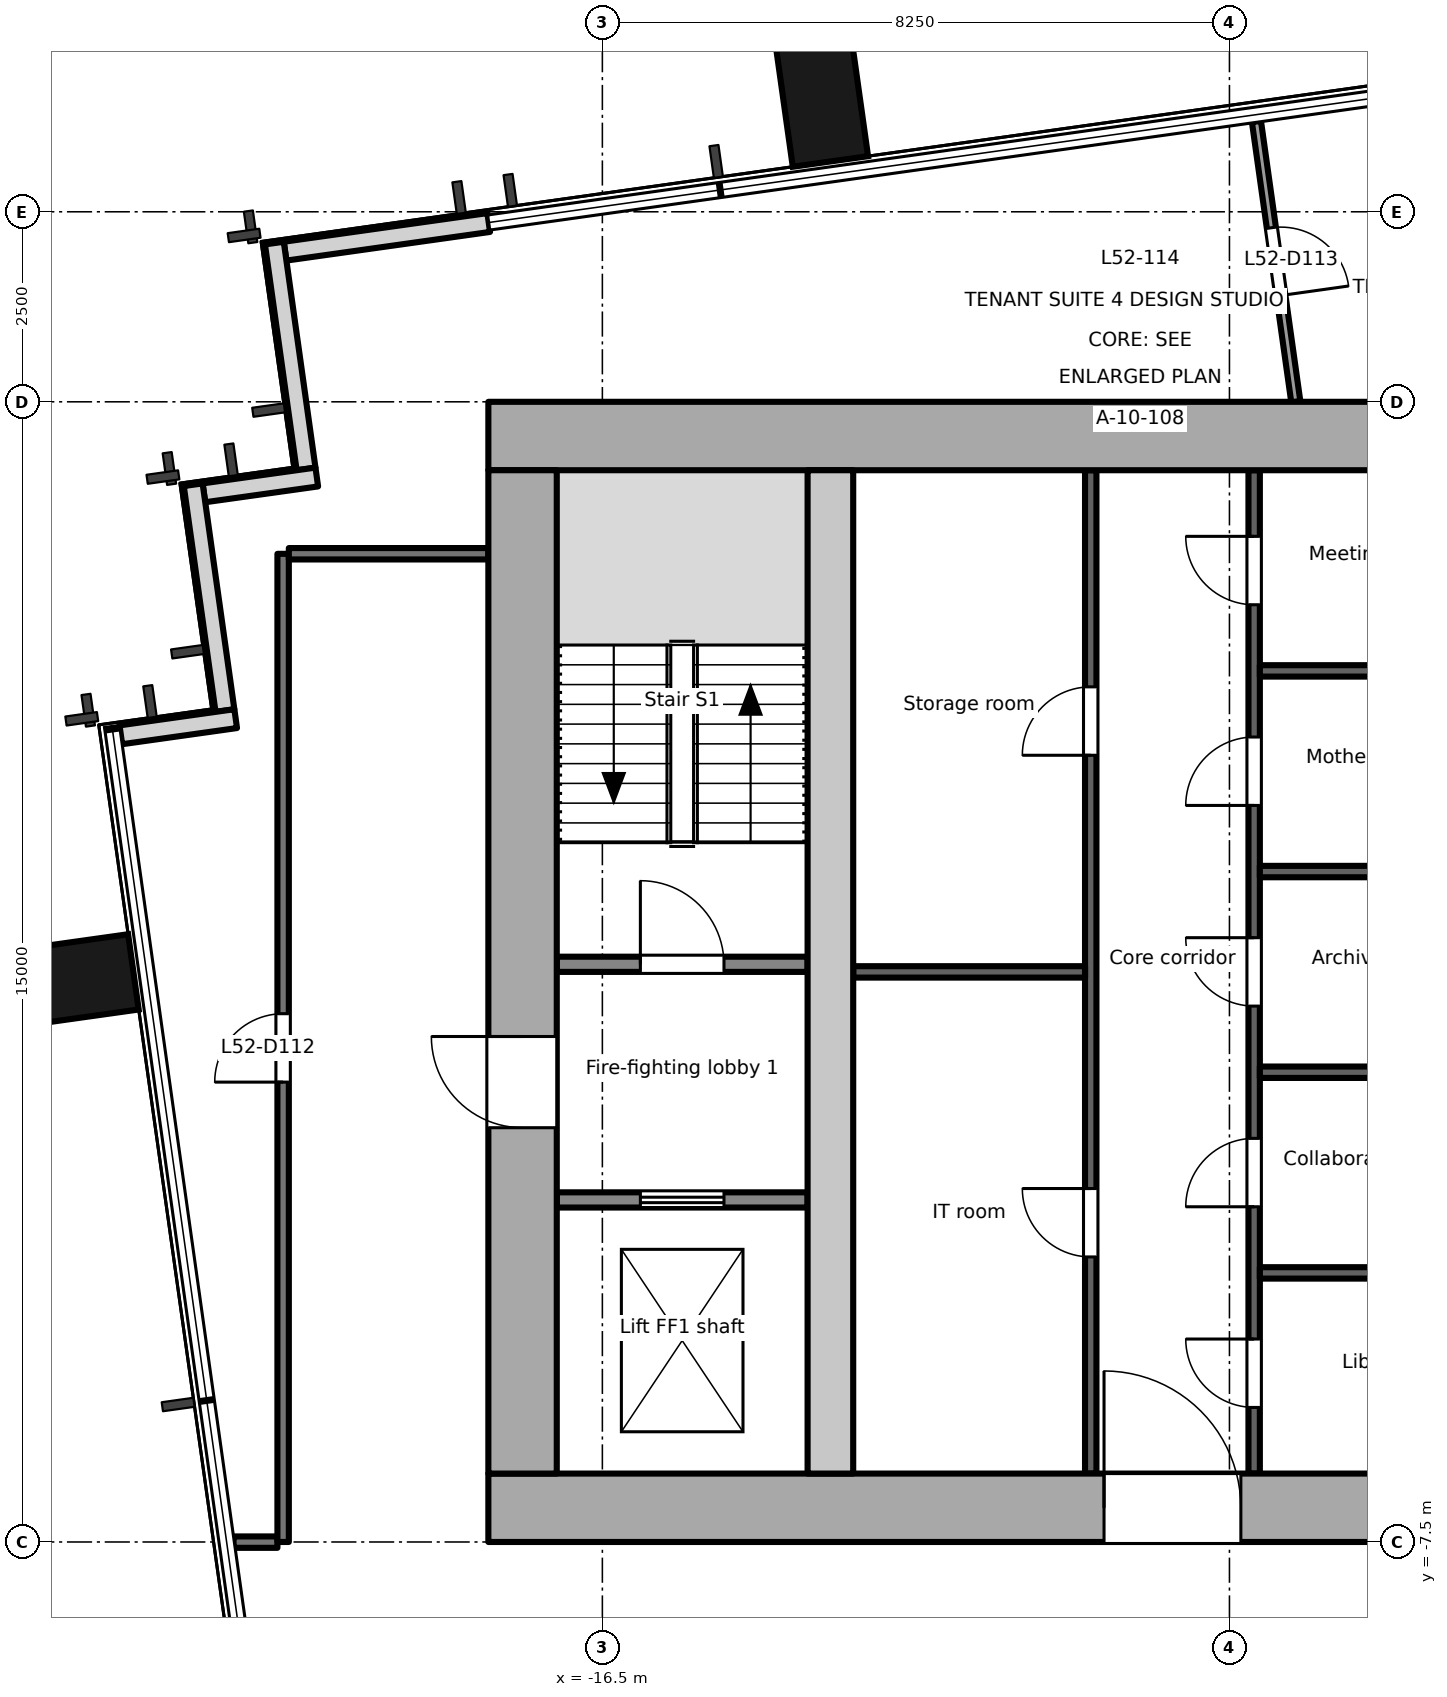
"""IFC4 building model, lengths in metres.
Left out: names, types, materials, properties, quantities, classifications, styles, units other than length and angle.
Written with IfcOpenShell. Run it as: python <this file> out.ifc"""

import sys

from ifc_helpers import new_model, si_unit, direction, frame, frame_2d, origin, origin_2d, place, context, subcontext, project, spatial, rectangle, extrude, element, fill, save


model = new_model("IFC4")
c1 = context("Model", 3, precision=1e-05, world=origin(), true_north=direction((0.0, 1.0)))
c2 = subcontext(c1, "Body", "Model", "MODEL_VIEW")
j1 = project(units=[si_unit("LENGTHUNIT", "METRE"), si_unit("PLANEANGLEUNIT", "RADIAN")], contexts=[c1])
p1 = place(None, origin())
s1 = spatial("IfcSite", under=j1, at=p1, CompositionType="ELEMENT")
p2 = place(p1, origin())
s2 = spatial("IfcBuilding", under=s1, at=p2, CompositionType="ELEMENT")
p3 = place(p2, frame((0.0, 0.0, 229.1)))
s3 = spatial("IfcBuildingStorey", under=s2, at=p3, CompositionType="ELEMENT", Elevation=229.1)
for number, where, z_axis, x_axis in (
    (1, (-23.561, -0.125, -0.2), (0.0, 0.0, 1.0), (-0.139, 0.99, 0.0)),
    (2, (-13.625, 11.553, -0.2), (0.0, 0.0, 1.0), (0.99, 0.139, 0.0)),
):
    element("IfcColumn", number, at=place(p3, frame(where, z_axis=z_axis, x_axis=x_axis)), inside=s3, PredefinedType="COLUMN", context=c2, shape_type="SweptSolid", body=[
        extrude(rectangle(XDim=1.0, YDim=1.8, at=origin_2d()), origin(), (0.0, 0.0, 1.0), 3.9),
    ])
p4 = place(p3, frame((-17.995, 9.859, 0.0), z_axis=(0.0, 0.0, 1.0), x_axis=(-0.99024510326, -0.139336411139, 0.0)))
e3 = element("IfcWall", 3, at=p4, inside=s3, PredefinedType="SOLIDWALL", context=c2, shape_type="SweptSolid", body=[
    extrude(rectangle(XDim=2.705, YDim=0.25, at=frame_2d((1.353, 0.0))), origin(), (0.0, 0.0, 1.0), 3.7),
])
p5 = place(p3, frame((-20.815, 9.588, 0.0), z_axis=(0.0, 0.0, 1.0), x_axis=(0.138983028379, -0.9902947631, 0.0)))
e4 = element("IfcWall", 4, at=p5, inside=s3, PredefinedType="SOLIDWALL", context=c2, shape_type="SweptSolid", body=[
    extrude(rectangle(XDim=3.0, YDim=0.25, at=frame_2d((1.5, 0.0))), origin(), (0.0, 0.0, 1.0), 3.7),
])
p6 = place(p3, frame((-20.257, 6.51, 0.0), z_axis=(0.0, 0.0, 1.0), x_axis=(-0.990330117064, -0.138730887823, 0.0)))
e5 = element("IfcWall", 5, at=p6, inside=s3, PredefinedType="SOLIDWALL", context=c2, shape_type="SweptSolid", body=[
    extrude(rectangle(XDim=1.499, YDim=0.25, at=frame_2d((0.75, 0.0))), origin(), (0.0, 0.0, 1.0), 3.7),
])
p7 = place(p3, frame((-21.883, 6.409, 0.0), z_axis=(0.0, 0.0, 1.0), x_axis=(0.139324658755, -0.990246756855, 0.0)))
e6 = element("IfcWall", 6, at=p7, inside=s3, PredefinedType="SOLIDWALL", context=c2, shape_type="SweptSolid", body=[
    extrude(rectangle(XDim=3.0, YDim=0.25, at=frame_2d((1.5, 0.0))), origin(), (0.0, 0.0, 1.0), 3.7),
])
p8 = place(p3, frame((-21.324, 3.332, 0.0), z_axis=(0.0, 0.0, 1.0), x_axis=(-0.990238641016, -0.139382329723, 0.0)))
e7 = element("IfcWall", 7, at=p8, inside=s3, PredefinedType="SOLIDWALL", context=c2, shape_type="SweptSolid", body=[
    extrude(rectangle(XDim=1.526, YDim=0.25, at=frame_2d((0.763, 0.0))), origin(), (0.0, 0.0, 1.0), 3.7),
])
p9 = place(p3, frame((-18.0, -7.05, -0.2), z_axis=(0.0, 0.0, 1.0), x_axis=(1.0, 0.0, 0.0)))
e8 = element("IfcWall", 8, at=p9, inside=s3, PredefinedType="SHEAR", context=c2, shape_type="SweptSolid", body=[
    extrude(rectangle(XDim=36.0, YDim=0.9, at=frame_2d((18.0, 0.0))), origin(), (0.0, 0.0, 1.0), 3.9),
])
p10 = place(p9, frame((8.1, 0.0, 0.2)))
e9 = element("IfcOpeningElement", 9, at=p10, cuts=e8, PredefinedType="OPENING", context=c2, shape_type="SweptSolid", body=[
    extrude(rectangle(XDim=1.8, YDim=2.1, at=frame_2d((0.9, 1.05))), frame((0.0, 0.46, 0.0), z_axis=(0.0, -1.0, 0.0), x_axis=(1.0, 0.0, 0.0)), (0.0, 0.0, 1.0), 0.921),
])
p11 = place(p9, frame((16.8, 0.0, 0.2)))
e10 = element("IfcOpeningElement", 10, at=p11, cuts=e8, PredefinedType="OPENING", context=c2, shape_type="SweptSolid", body=[
    extrude(rectangle(XDim=2.4, YDim=2.1, at=frame_2d((1.2, 1.05))), frame((0.0, 0.46, 0.0), z_axis=(0.0, -1.0, 0.0), x_axis=(1.0, 0.0, 0.0)), (0.0, 0.0, 1.0), 0.921),
])
p12 = place(p9, frame((26.1, 0.0, 0.2)))
e11 = element("IfcOpeningElement", 11, at=p12, cuts=e8, PredefinedType="OPENING", context=c2, shape_type="SweptSolid", body=[
    extrude(rectangle(XDim=2.4, YDim=2.1, at=frame_2d((1.2, 1.05))), frame((0.0, 0.46, 0.0), z_axis=(0.0, -1.0, 0.0), x_axis=(1.0, 0.0, 0.0)), (0.0, 0.0, 1.0), 0.921),
])
p13 = place(p3, frame((-18.0, 7.05, -0.2), z_axis=(0.0, 0.0, 1.0), x_axis=(1.0, 0.0, 0.0)))
e12 = element("IfcWall", 12, at=p13, inside=s3, PredefinedType="SHEAR", context=c2, shape_type="SweptSolid", body=[
    extrude(rectangle(XDim=36.0, YDim=0.9, at=frame_2d((18.0, 0.0))), origin(), (0.0, 0.0, 1.0), 3.9),
])
p14 = place(p3, frame((-17.55, -6.6, -0.2), z_axis=(0.0, 0.0, 1.0), x_axis=(0.0, 1.0, 0.0)))
e13 = element("IfcWall", 13, at=p14, inside=s3, PredefinedType="SHEAR", context=c2, shape_type="SweptSolid", body=[
    extrude(rectangle(XDim=13.2, YDim=0.9, at=frame_2d((6.6, 0.0))), origin(), (0.0, 0.0, 1.0), 3.9),
])
p15 = place(p14, frame((4.55, 0.0, 0.2)))
e14 = element("IfcOpeningElement", 14, at=p15, cuts=e13, PredefinedType="OPENING", context=c2, shape_type="SweptSolid", body=[
    extrude(rectangle(XDim=1.2, YDim=2.1, at=frame_2d((0.6, 1.05))), frame((0.0, 0.46, 0.0), z_axis=(0.0, -1.0, 0.0), x_axis=(1.0, 0.0, 0.0)), (0.0, 0.0, 1.0), 0.921),
])
p16 = place(p3, frame((-13.5, -6.6, -0.2), z_axis=(0.0, 0.0, 1.0), x_axis=(0.0, 1.0, 0.0)))
e15 = element("IfcWall", 15, at=p16, inside=s3, PredefinedType="SHEAR", context=c2, shape_type="SweptSolid", body=[
    extrude(rectangle(XDim=13.2, YDim=0.6, at=frame_2d((6.6, 0.0))), origin(), (0.0, 0.0, 1.0), 3.9),
])
p17 = place(p3, frame((-17.1, -3.0, 0.0), z_axis=(0.0, 0.0, 1.0), x_axis=(1.0, 0.0, 0.0)))
e16 = element("IfcWall", 16, at=p17, inside=s3, PredefinedType="PARTITIONING", context=c2, shape_type="SweptSolid", body=[
    extrude(rectangle(XDim=3.3, YDim=0.2, at=frame_2d((1.65, 0.0))), origin(), (0.0, 0.0, 1.0), 3.7),
])
p18 = place(p17, frame((1.1, 0.0, 0.0)))
e17 = element("IfcOpeningElement", 17, at=p18, cuts=e16, PredefinedType="OPENING", context=c2, shape_type="SweptSolid", body=[
    extrude(rectangle(XDim=1.1, YDim=2.1, at=frame_2d((0.55, 1.05))), frame((0.0, 0.111, 0.0), z_axis=(0.0, -1.0, 0.0), x_axis=(1.0, 0.0, 0.0)), (0.0, 0.0, 1.0), 0.221),
])
p19 = place(p3, frame((-17.1, 0.1, 0.0), z_axis=(0.0, 0.0, 1.0), x_axis=(1.0, 0.0, 0.0)))
e18 = element("IfcWall", 18, at=p19, inside=s3, PredefinedType="PARTITIONING", context=c2, shape_type="SweptSolid", body=[
    extrude(rectangle(XDim=3.3, YDim=0.2, at=frame_2d((1.65, 0.0))), origin(), (0.0, 0.0, 1.0), 3.7),
])
p20 = place(p19, frame((1.1, 0.0, 0.0)))
e19 = element("IfcOpeningElement", 19, at=p20, cuts=e18, PredefinedType="OPENING", context=c2, shape_type="SweptSolid", body=[
    extrude(rectangle(XDim=1.1, YDim=2.1, at=frame_2d((0.55, 1.05))), frame((0.0, 0.111, 0.0), z_axis=(0.0, -1.0, 0.0), x_axis=(1.0, 0.0, 0.0)), (0.0, 0.0, 1.0), 0.221),
])
p21 = place(p3, frame((-10.075, -6.6, 0.0), z_axis=(0.0, 0.0, 1.0), x_axis=(0.0, 1.0, 0.0)))
e20 = element("IfcWall", 20, at=p21, inside=s3, PredefinedType="PARTITIONING", context=c2, shape_type="SweptSolid", body=[
    extrude(rectangle(XDim=13.2, YDim=0.15, at=frame_2d((6.6, 0.0))), origin(), (0.0, 0.0, 1.0), 3.7),
])
p22 = place(p21, frame((2.85, 0.0, 0.0)))
e21 = element("IfcOpeningElement", 21, at=p22, cuts=e20, PredefinedType="OPENING", context=c2, shape_type="SweptSolid", body=[
    extrude(rectangle(XDim=0.9, YDim=2.1, at=frame_2d((0.45, 1.05))), frame((0.0, 0.085, 0.0), z_axis=(0.0, -1.0, 0.0), x_axis=(1.0, 0.0, 0.0)), (0.0, 0.0, 1.0), 0.171),
])
p23 = place(p21, frame((9.45, 0.0, 0.0)))
e22 = element("IfcOpeningElement", 22, at=p23, cuts=e20, PredefinedType="OPENING", context=c2, shape_type="SweptSolid", body=[
    extrude(rectangle(XDim=0.9, YDim=2.1, at=frame_2d((0.45, 1.05))), frame((0.0, 0.085, 0.0), z_axis=(0.0, -1.0, 0.0), x_axis=(1.0, 0.0, 0.0)), (0.0, 0.0, 1.0), 0.171),
])
p24 = place(p3, frame((-13.2, 0.0, 0.0), z_axis=(0.0, 0.0, 1.0), x_axis=(1.0, 0.0, 0.0)))
e23 = element("IfcWall", 23, at=p24, inside=s3, PredefinedType="PARTITIONING", context=c2, shape_type="SweptSolid", body=[
    extrude(rectangle(XDim=3.05, YDim=0.15, at=frame_2d((1.525, 0.0))), origin(), (0.0, 0.0, 1.0), 3.7),
])
p25 = place(p3, frame((-7.925, -6.6, 0.0), z_axis=(0.0, 0.0, 1.0), x_axis=(0.0, 1.0, 0.0)))
e24 = element("IfcWall", 24, at=p25, inside=s3, PredefinedType="PARTITIONING", context=c2, shape_type="SweptSolid", body=[
    extrude(rectangle(XDim=13.2, YDim=0.15, at=frame_2d((6.6, 0.0))), origin(), (0.0, 0.0, 1.0), 3.7),
])
p26 = place(p25, frame((0.87, 0.0, 0.0)))
e25 = element("IfcOpeningElement", 25, at=p26, cuts=e24, PredefinedType="OPENING", context=c2, shape_type="SweptSolid", body=[
    extrude(rectangle(XDim=0.9, YDim=2.1, at=frame_2d((0.45, 1.05))), frame((0.0, 0.085, 0.0), z_axis=(0.0, -1.0, 0.0), x_axis=(1.0, 0.0, 0.0)), (0.0, 0.0, 1.0), 0.171),
])
p27 = place(p25, frame((3.51, 0.0, 0.0)))
e26 = element("IfcOpeningElement", 26, at=p27, cuts=e24, PredefinedType="OPENING", context=c2, shape_type="SweptSolid", body=[
    extrude(rectangle(XDim=0.9, YDim=2.1, at=frame_2d((0.45, 1.05))), frame((0.0, 0.085, 0.0), z_axis=(0.0, -1.0, 0.0), x_axis=(1.0, 0.0, 0.0)), (0.0, 0.0, 1.0), 0.171),
])
p28 = place(p25, frame((6.15, 0.0, 0.0)))
e27 = element("IfcOpeningElement", 27, at=p28, cuts=e24, PredefinedType="OPENING", context=c2, shape_type="SweptSolid", body=[
    extrude(rectangle(XDim=0.9, YDim=2.1, at=frame_2d((0.45, 1.05))), frame((0.0, 0.085, 0.0), z_axis=(0.0, -1.0, 0.0), x_axis=(1.0, 0.0, 0.0)), (0.0, 0.0, 1.0), 0.171),
])
p29 = place(p25, frame((8.79, 0.0, 0.0)))
e28 = element("IfcOpeningElement", 28, at=p29, cuts=e24, PredefinedType="OPENING", context=c2, shape_type="SweptSolid", body=[
    extrude(rectangle(XDim=0.9, YDim=2.1, at=frame_2d((0.45, 1.05))), frame((0.0, 0.085, 0.0), z_axis=(0.0, -1.0, 0.0), x_axis=(1.0, 0.0, 0.0)), (0.0, 0.0, 1.0), 0.171),
])
p30 = place(p25, frame((11.43, 0.0, 0.0)))
e29 = element("IfcOpeningElement", 29, at=p30, cuts=e24, PredefinedType="OPENING", context=c2, shape_type="SweptSolid", body=[
    extrude(rectangle(XDim=0.9, YDim=2.1, at=frame_2d((0.45, 1.05))), frame((0.0, 0.085, 0.0), z_axis=(0.0, -1.0, 0.0), x_axis=(1.0, 0.0, 0.0)), (0.0, 0.0, 1.0), 0.171),
])
for number, where, z_axis, x_axis in (
    (30, (-7.85, -3.96, 0.0), (0.0, 0.0, 1.0), (1.0, 0.0, 0.0)),
    (31, (-7.85, -1.32, 0.0), (0.0, 0.0, 1.0), (1.0, 0.0, 0.0)),
    (32, (-7.85, 1.32, 0.0), (0.0, 0.0, 1.0), (1.0, 0.0, 0.0)),
    (33, (-7.85, 3.96, 0.0), (0.0, 0.0, 1.0), (1.0, 0.0, 0.0)),
):
    element("IfcWall", number, at=place(p3, frame(where, z_axis=z_axis, x_axis=x_axis)), inside=s3, PredefinedType="PARTITIONING", context=c2, shape_type="SweptSolid", body=[
        extrude(rectangle(XDim=3.05, YDim=0.15, at=frame_2d((1.525, 0.0))), origin(), (0.0, 0.0, 1.0), 3.7),
    ])
p31 = place(p3, frame((-21.352, -7.502, 0.0), z_axis=(0.0, 0.0, 1.0), x_axis=(1.0, 0.0, 0.0)))
e34 = element("IfcWall", 34, at=p31, inside=s3, PredefinedType="PARTITIONING", context=c2, shape_type="SweptSolid", body=[
    extrude(rectangle(XDim=0.577, YDim=0.15, at=frame_2d((0.289, 0.0))), origin(), (0.0, 0.0, 1.0), 3.7),
])
p32 = place(p3, frame((-20.7, -7.5, 0.0), z_axis=(0.0, 0.0, 1.0), x_axis=(0.0, 1.0, 0.0)))
e35 = element("IfcWall", 35, at=p32, inside=s3, PredefinedType="PARTITIONING", context=c2, shape_type="SweptSolid", body=[
    extrude(rectangle(XDim=13.0, YDim=0.15, at=frame_2d((6.5, 0.0))), origin(), (0.0, 0.0, 1.0), 3.4),
])
p33 = place(p32, frame((6.05, 0.0, 0.0)))
e36 = element("IfcOpeningElement", 36, at=p33, cuts=e35, PredefinedType="OPENING", context=c2, shape_type="SweptSolid", body=[
    extrude(rectangle(XDim=0.9, YDim=2.1, at=frame_2d((0.45, 1.05))), frame((0.0, 0.085, 0.0), z_axis=(0.0, -1.0, 0.0), x_axis=(1.0, 0.0, 0.0)), (0.0, 0.0, 1.0), 0.171),
])
p34 = place(p3, frame((-20.625, 5.501, 0.0), z_axis=(0.0, 0.0, 1.0), x_axis=(1.0, 0.0, 0.0)))
e37 = element("IfcWall", 37, at=p34, inside=s3, PredefinedType="PARTITIONING", context=c2, shape_type="SweptSolid", body=[
    extrude(rectangle(XDim=2.625, YDim=0.15, at=frame_2d((1.312, 0.0))), origin(), (0.0, 0.0, 1.0), 3.7),
])
p35 = place(p3, frame((-7.895, 11.188, 0.0), z_axis=(0.0, 0.0, 1.0), x_axis=(0.139108182039, -0.990277190331, 0.0)))
e38 = element("IfcWall", 38, at=p35, inside=s3, PredefinedType="PARTITIONING", context=c2, shape_type="SweptSolid", body=[
    extrude(rectangle(XDim=3.724, YDim=0.12, at=frame_2d((1.862, 0.0))), origin(), (0.0, 0.0, 1.0), 3.7),
])
p36 = place(p35, frame((1.412, 0.0, 0.0)))
e39 = element("IfcOpeningElement", 39, at=p36, cuts=e38, PredefinedType="OPENING", context=c2, shape_type="SweptSolid", body=[
    extrude(rectangle(XDim=0.9, YDim=2.1, at=frame_2d((0.45, 1.05))), frame((0.0, 0.071, 0.0), z_axis=(0.0, -1.0, 0.0), x_axis=(1.0, 0.0, 0.0)), (0.0, 0.0, 1.0), 0.141),
])
p37 = place(p18, origin())
e40 = element("IfcDoor", 40, at=p37, inside=s3, OperationType="DOUBLE_DOOR_SLIDING", PredefinedType="DOOR", context=c2, shape_type="SweptSolid", body=[
    extrude(rectangle(XDim=1.1, YDim=2.1, at=frame_2d((0.55, 1.05))), frame((0.0, 0.025, 0.0), z_axis=(0.0, -1.0, 0.0), x_axis=(1.0, 0.0, 0.0)), (0.0, 0.0, 1.0), 0.05),
])
fill(e17, e40)
p38 = place(p15, origin())
e41 = element("IfcDoor", 41, at=p38, inside=s3, OperationType="SINGLE_SWING_RIGHT", PredefinedType="DOOR", context=c2, shape_type="SweptSolid", body=[
    extrude(rectangle(XDim=1.2, YDim=2.1, at=frame_2d((0.6, 1.05))), frame((0.0, 0.025, 0.0), z_axis=(0.0, -1.0, 0.0), x_axis=(1.0, 0.0, 0.0)), (0.0, 0.0, 1.0), 0.05),
])
fill(e14, e41)
p39 = place(p20, origin())
e42 = element("IfcDoor", 42, at=p39, inside=s3, OperationType="SINGLE_SWING_LEFT", PredefinedType="DOOR", context=c2, shape_type="SweptSolid", body=[
    extrude(rectangle(XDim=1.1, YDim=2.1, at=frame_2d((0.55, 1.05))), frame((0.0, 0.025, 0.0), z_axis=(0.0, -1.0, 0.0), x_axis=(1.0, 0.0, 0.0)), (0.0, 0.0, 1.0), 0.05),
])
fill(e19, e42)
p40 = place(p22, origin())
e43 = element("IfcDoor", 43, at=p40, inside=s3, OperationType="SINGLE_SWING_RIGHT", PredefinedType="DOOR", context=c2, shape_type="SweptSolid", body=[
    extrude(rectangle(XDim=0.9, YDim=2.1, at=frame_2d((0.45, 1.05))), frame((0.0, 0.025, 0.0), z_axis=(0.0, -1.0, 0.0), x_axis=(1.0, 0.0, 0.0)), (0.0, 0.0, 1.0), 0.05),
])
fill(e21, e43)
p41 = place(p23, origin())
e44 = element("IfcDoor", 44, at=p41, inside=s3, OperationType="SINGLE_SWING_LEFT", PredefinedType="DOOR", context=c2, shape_type="SweptSolid", body=[
    extrude(rectangle(XDim=0.9, YDim=2.1, at=frame_2d((0.45, 1.05))), frame((0.0, 0.025, 0.0), z_axis=(0.0, -1.0, 0.0), x_axis=(1.0, 0.0, 0.0)), (0.0, 0.0, 1.0), 0.05),
])
fill(e22, e44)
p42 = place(p26, origin())
e45 = element("IfcDoor", 45, at=p42, inside=s3, OperationType="SINGLE_SWING_RIGHT", PredefinedType="DOOR", context=c2, shape_type="SweptSolid", body=[
    extrude(rectangle(XDim=0.9, YDim=2.1, at=frame_2d((0.45, 1.05))), frame((0.0, 0.025, 0.0), z_axis=(0.0, -1.0, 0.0), x_axis=(1.0, 0.0, 0.0)), (0.0, 0.0, 1.0), 0.05),
])
fill(e25, e45)
p43 = place(p27, origin())
e46 = element("IfcDoor", 46, at=p43, inside=s3, OperationType="SINGLE_SWING_LEFT", PredefinedType="DOOR", context=c2, shape_type="SweptSolid", body=[
    extrude(rectangle(XDim=0.9, YDim=2.1, at=frame_2d((0.45, 1.05))), frame((0.0, 0.025, 0.0), z_axis=(0.0, -1.0, 0.0), x_axis=(1.0, 0.0, 0.0)), (0.0, 0.0, 1.0), 0.05),
])
fill(e26, e46)
p44 = place(p28, origin())
e47 = element("IfcDoor", 47, at=p44, inside=s3, OperationType="SINGLE_SWING_RIGHT", PredefinedType="DOOR", context=c2, shape_type="SweptSolid", body=[
    extrude(rectangle(XDim=0.9, YDim=2.1, at=frame_2d((0.45, 1.05))), frame((0.0, 0.025, 0.0), z_axis=(0.0, -1.0, 0.0), x_axis=(1.0, 0.0, 0.0)), (0.0, 0.0, 1.0), 0.05),
])
fill(e27, e47)
p45 = place(p29, origin())
e48 = element("IfcDoor", 48, at=p45, inside=s3, OperationType="SINGLE_SWING_LEFT", PredefinedType="DOOR", context=c2, shape_type="SweptSolid", body=[
    extrude(rectangle(XDim=0.9, YDim=2.1, at=frame_2d((0.45, 1.05))), frame((0.0, 0.025, 0.0), z_axis=(0.0, -1.0, 0.0), x_axis=(1.0, 0.0, 0.0)), (0.0, 0.0, 1.0), 0.05),
])
fill(e28, e48)
p46 = place(p30, origin())
e49 = element("IfcDoor", 49, at=p46, inside=s3, OperationType="SINGLE_SWING_RIGHT", PredefinedType="DOOR", context=c2, shape_type="SweptSolid", body=[
    extrude(rectangle(XDim=0.9, YDim=2.1, at=frame_2d((0.45, 1.05))), frame((0.0, 0.025, 0.0), z_axis=(0.0, -1.0, 0.0), x_axis=(1.0, 0.0, 0.0)), (0.0, 0.0, 1.0), 0.05),
])
fill(e29, e49)
p47 = place(p10, origin())
e50 = element("IfcDoor", 50, at=p47, inside=s3, OperationType="SINGLE_SWING_LEFT", PredefinedType="DOOR", context=c2, shape_type="SweptSolid", body=[
    extrude(rectangle(XDim=1.8, YDim=2.1, at=frame_2d((0.9, 1.05))), frame((0.0, 0.025, 0.0), z_axis=(0.0, -1.0, 0.0), x_axis=(1.0, 0.0, 0.0)), (0.0, 0.0, 1.0), 0.05),
])
fill(e9, e50)
p48 = place(p33, origin())
e51 = element("IfcDoor", 51, at=p48, inside=s3, OperationType="SINGLE_SWING_LEFT", PredefinedType="DOOR", context=c2, shape_type="SweptSolid", body=[
    extrude(rectangle(XDim=0.9, YDim=2.1, at=frame_2d((0.45, 1.05))), frame((0.0, 0.025, 0.0), z_axis=(0.0, -1.0, 0.0), x_axis=(1.0, 0.0, 0.0)), (0.0, 0.0, 1.0), 0.05),
])
fill(e36, e51)
p49 = place(p36, origin())
e52 = element("IfcDoor", 52, at=p49, inside=s3, OperationType="SINGLE_SWING_RIGHT", PredefinedType="DOOR", context=c2, shape_type="SweptSolid", body=[
    extrude(rectangle(XDim=0.9, YDim=2.1, at=frame_2d((0.45, 1.05))), frame((0.0, 0.025, 0.0), z_axis=(0.0, -1.0, 0.0), x_axis=(1.0, 0.0, 0.0)), (0.0, 0.0, 1.0), 0.05),
])
fill(e39, e52)
save(model, sys.argv[1])
